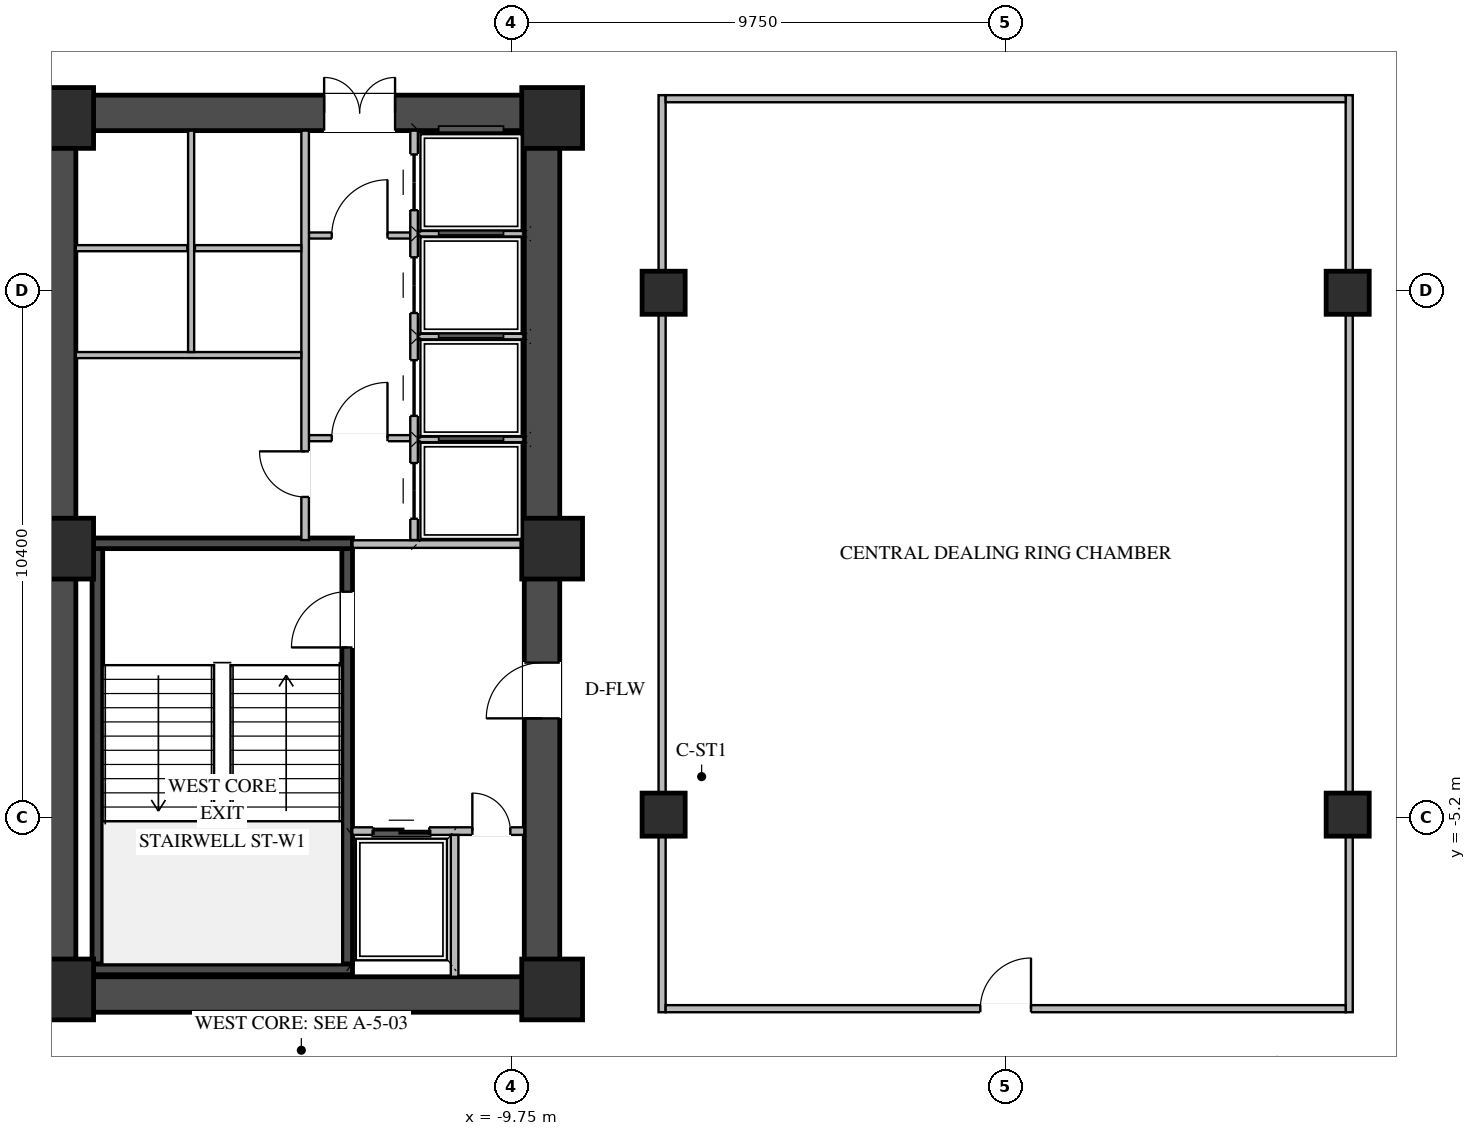
"""IFC4 building model, lengths in metres.
Left out: names, types, materials, properties, quantities, classifications, styles, units other than length and angle.
Written with IfcOpenShell. Run it as: python <this file> out.ifc"""

import sys

from ifc_helpers import new_model, si_unit, direction, frame, frame_2d, origin, origin_2d, place, context, subcontext, project, spatial, rectangle, i_section, extrude, element, fill, save


model = new_model("IFC4")
c1 = context("Model", 3, precision=1e-05, world=origin(), true_north=direction((0.0, 1.0)))
c2 = subcontext(c1, "Body", "Model", "MODEL_VIEW")
j1 = project(units=[si_unit("LENGTHUNIT", "METRE"), si_unit("PLANEANGLEUNIT", "RADIAN")], contexts=[c1])
p1 = place(None, origin())
s1 = spatial("IfcSite", under=j1, at=p1, CompositionType="ELEMENT")
p2 = place(p1, origin())
s2 = spatial("IfcBuilding", under=s1, at=p2, CompositionType="ELEMENT")
p3 = place(p2, frame((0.0, 0.0, 27.0)))
s3 = spatial("IfcBuildingStorey", under=s2, at=p3, CompositionType="ELEMENT", Elevation=27.0)
p4 = place(p3, frame((-19.05, -8.7, 0.0), z_axis=(0.0, 0.0, 1.0), x_axis=(1.0, 0.0, 0.0)))
e1 = element("IfcWall", 1, at=p4, inside=s3, PredefinedType="SHEAR", context=c2, shape_type="SweptSolid", body=[
    extrude(rectangle(XDim=10.25, YDim=0.7, at=frame_2d((5.125, 0.0))), origin(), (0.0, 0.0, 1.0), 4.02),
])
p5 = place(p3, frame((-19.05, 8.7, 0.0), z_axis=(0.0, 0.0, 1.0), x_axis=(1.0, 0.0, 0.0)))
e2 = element("IfcWall", 2, at=p5, inside=s3, PredefinedType="SHEAR", context=c2, shape_type="SweptSolid", body=[
    extrude(rectangle(XDim=10.25, YDim=0.7, at=frame_2d((5.125, 0.0))), origin(), (0.0, 0.0, 1.0), 4.02),
])
p6 = place(p5, frame((5.6, 0.0, 0.0)))
e3 = element("IfcOpeningElement", 3, at=p6, cuts=e2, PredefinedType="OPENING", context=c2, shape_type="SweptSolid", body=[
    extrude(rectangle(XDim=1.4, YDim=2.05, at=frame_2d((0.7, 1.025))), frame((0.0, 0.36, 0.0), z_axis=(0.0, -1.0, 0.0), x_axis=(1.0, 0.0, 0.0)), (0.0, 0.0, 1.0), 0.72),
])
p7 = place(p3, frame((-18.7, -8.35, 0.0), z_axis=(0.0, 0.0, 1.0), x_axis=(0.0, 1.0, 0.0)))
e4 = element("IfcWall", 4, at=p7, inside=s3, PredefinedType="SHEAR", context=c2, shape_type="SweptSolid", body=[
    extrude(rectangle(XDim=16.7, YDim=0.7, at=frame_2d((8.35, 0.0))), origin(), (0.0, 0.0, 1.0), 4.02),
])
p8 = place(p3, frame((-9.15, -8.35, 0.0), z_axis=(0.0, 0.0, 1.0), x_axis=(0.0, 1.0, 0.0)))
e5 = element("IfcWall", 5, at=p8, inside=s3, PredefinedType="SHEAR", context=c2, shape_type="SweptSolid", body=[
    extrude(rectangle(XDim=16.7, YDim=0.7, at=frame_2d((8.35, 0.0))), origin(), (0.0, 0.0, 1.0), 4.02),
])
p9 = place(p8, frame((5.1, 0.0, 0.0)))
e6 = element("IfcOpeningElement", 6, at=p9, cuts=e5, PredefinedType="OPENING", context=c2, shape_type="SweptSolid", body=[
    extrude(rectangle(XDim=1.1, YDim=2.08, at=frame_2d((0.55, 1.04))), frame((0.0, 0.36, 0.0), z_axis=(0.0, -1.0, 0.0), x_axis=(1.0, 0.0, 0.0)), (0.0, 0.0, 1.0), 0.72),
])
p10 = place(p3, frame((-12.995, -8.1, 0.0), z_axis=(0.0, 0.0, 1.0), x_axis=(0.0, 1.0, 0.0)))
e7 = element("IfcWall", 7, at=p10, inside=s3, PredefinedType="SHEAR", context=c2, shape_type="SweptSolid", body=[
    extrude(rectangle(XDim=8.2, YDim=0.21, at=frame_2d((4.1, 0.0))), origin(), (0.0, 0.0, 1.0), 4.02),
])
p11 = place(p10, frame((6.25, 0.0, 0.0)))
e8 = element("IfcOpeningElement", 8, at=p11, cuts=e7, PredefinedType="OPENING", context=c2, shape_type="SweptSolid", body=[
    extrude(rectangle(XDim=1.1, YDim=2.15, at=frame_2d((0.55, 1.075))), frame((0.0, 0.115, 0.0), z_axis=(0.0, -1.0, 0.0), x_axis=(1.0, 0.0, 0.0)), (0.0, 0.0, 1.0), 0.23),
])
p12 = place(p3, frame((-17.925, -8.1, 0.0), z_axis=(0.0, 0.0, 1.0), x_axis=(0.0, 1.0, 0.0)))
e9 = element("IfcWall", 9, at=p12, inside=s3, PredefinedType="SHEAR", context=c2, shape_type="SweptSolid", body=[
    extrude(rectangle(XDim=8.2, YDim=0.21, at=frame_2d((4.1, 0.0))), origin(), (0.0, 0.0, 1.0), 4.02),
])
for number, where, z_axis, x_axis in (
    (10, (-18.03, -8.205, 0.0), (0.0, 0.0, 1.0), (1.0, 0.0, 0.0)),
    (11, (-12.89, 0.205, 0.0), (0.0, 0.0, 1.0), (-1.0, 0.0, 0.0)),
):
    element("IfcWall", number, at=place(p3, frame(where, z_axis=z_axis, x_axis=x_axis)), inside=s3, PredefinedType="SHEAR", context=c2, shape_type="SweptSolid", body=[
        extrude(rectangle(XDim=5.14, YDim=0.21, at=frame_2d((2.57, 0.0))), origin(), (0.0, 0.0, 1.0), 4.02),
    ])
for number, where, z_axis, x_axis in (
    (12, (-8.95, -8.6, 0.0), (0.0, 0.0, 1.0), (1.0, 0.0, 0.0)),
    (13, (-8.95, 0.1, 0.0), (0.0, 0.0, 1.0), (1.0, 0.0, 0.0)),
    (14, (-8.95, 8.6, 0.0), (0.0, 0.0, 1.0), (1.0, 0.0, 0.0)),
    (15, (-18.6, -8.6, 0.0), (0.0, 0.0, 1.0), (1.0, 0.0, 0.0)),
    (16, (-18.6, 0.1, 0.0), (0.0, 0.0, 1.0), (1.0, 0.0, 0.0)),
    (17, (-18.6, 8.6, 0.0), (0.0, 0.0, 1.0), (1.0, 0.0, 0.0)),
):
    element("IfcColumn", number, at=place(p3, frame(where, z_axis=z_axis, x_axis=x_axis)), inside=s3, PredefinedType="COLUMN", context=c2, shape_type="SweptSolid", body=[
        extrude(rectangle(XDim=1.2, YDim=1.2, at=origin_2d()), origin(), (0.0, 0.0, 1.0), 4.2),
    ])
for number, where, z_axis, x_axis in (
    (18, (-6.75, -5.15, 0.0), (0.0, 0.0, 1.0), (1.0, 0.0, 0.0)),
    (19, (-6.75, 5.15, 0.0), (0.0, 0.0, 1.0), (1.0, 0.0, 0.0)),
    (20, (6.75, -5.15, 0.0), (0.0, 0.0, 1.0), (1.0, 0.0, 0.0)),
    (21, (6.75, 5.15, 0.0), (0.0, 0.0, 1.0), (1.0, 0.0, 0.0)),
):
    element("IfcColumn", number, at=place(p3, frame(where, z_axis=z_axis, x_axis=x_axis)), inside=s3, PredefinedType="COLUMN", context=c2, shape_type="SweptSolid", body=[
        extrude(i_section(OverallWidth=0.85, OverallDepth=0.85, WebThickness=0.032, FlangeThickness=0.048, at=origin_2d()), origin(), (0.0, 0.0, 1.0), 4.2),
    ])
p13 = place(p3, frame((-12.895, -5.475, 0.0), z_axis=(0.0, 0.0, 1.0), x_axis=(1.0, 0.0, 0.0)))
e22 = element("IfcWall", 22, at=p13, inside=s3, PredefinedType="STANDARD", context=c2, shape_type="SweptSolid", body=[
    extrude(rectangle(XDim=3.395, YDim=0.15, at=frame_2d((1.698, 0.0))), origin(), (0.0, 0.0, 1.0), 4.0),
])
p14 = place(p13, frame((0.42, 0.0, 0.0)))
e23 = element("IfcOpeningElement", 23, at=p14, cuts=e22, PredefinedType="OPENING", context=c2, shape_type="SweptSolid", body=[
    extrude(rectangle(XDim=1.1, YDim=2.15, at=frame_2d((0.55, 1.075))), frame((0.0, 0.085, 0.0), z_axis=(0.0, -1.0, 0.0), x_axis=(1.0, 0.0, 0.0)), (0.0, 0.0, 1.0), 0.17),
])
p15 = place(p13, frame((2.37, 0.0, 0.0)))
e24 = element("IfcOpeningElement", 24, at=p15, cuts=e22, PredefinedType="OPENING", context=c2, shape_type="SweptSolid", body=[
    extrude(rectangle(XDim=0.75, YDim=2.05, at=frame_2d((0.375, 1.025))), frame((0.0, 0.085, 0.0), z_axis=(0.0, -1.0, 0.0), x_axis=(1.0, 0.0, 0.0)), (0.0, 0.0, 1.0), 0.17),
])
p16 = place(p3, frame((-10.875, -8.35, 0.0), z_axis=(0.0, 0.0, 1.0), x_axis=(0.0, 1.0, 0.0)))
e25 = element("IfcWall", 25, at=p16, inside=s3, PredefinedType="STANDARD", context=c2, shape_type="SweptSolid", body=[
    extrude(rectangle(XDim=2.8, YDim=0.15, at=frame_2d((1.4, 0.0))), origin(), (0.0, 0.0, 1.0), 4.0),
])
p17 = place(p3, frame((-12.89, 0.19, 0.0), z_axis=(0.0, 0.0, 1.0), x_axis=(1.0, 0.0, 0.0)))
e26 = element("IfcWall", 26, at=p17, inside=s3, PredefinedType="STANDARD", context=c2, shape_type="SweptSolid", body=[
    extrude(rectangle(XDim=3.39, YDim=0.15, at=frame_2d((1.695, 0.0))), origin(), (0.0, 0.0, 1.0), 3.395),
])
p18 = place(p3, frame((-13.75, 2.28, 0.0), z_axis=(0.0, 0.0, 1.0), x_axis=(1.0, 0.0, 0.0)))
e27 = element("IfcWall", 27, at=p18, inside=s3, PredefinedType="STANDARD", context=c2, shape_type="SweptSolid", body=[
    extrude(rectangle(XDim=2.0, YDim=0.12, at=frame_2d((1.0, 0.0))), origin(), (0.0, 0.0, 1.0), 4.0),
])
p19 = place(p18, frame((0.45, 0.0, 0.0)))
e28 = element("IfcOpeningElement", 28, at=p19, cuts=e27, PredefinedType="OPENING", context=c2, shape_type="SweptSolid", body=[
    extrude(rectangle(XDim=1.1, YDim=2.1, at=frame_2d((0.55, 1.05))), frame((0.0, 0.07, 0.0), z_axis=(0.0, -1.0, 0.0), x_axis=(1.0, 0.0, 0.0)), (0.0, 0.0, 1.0), 0.14),
])
p20 = place(p3, frame((-13.75, 6.28, 0.0), z_axis=(0.0, 0.0, 1.0), x_axis=(1.0, 0.0, 0.0)))
e29 = element("IfcWall", 29, at=p20, inside=s3, PredefinedType="STANDARD", context=c2, shape_type="SweptSolid", body=[
    extrude(rectangle(XDim=2.0, YDim=0.12, at=frame_2d((1.0, 0.0))), origin(), (0.0, 0.0, 1.0), 4.0),
])
p21 = place(p20, frame((0.45, 0.0, 0.0)))
e30 = element("IfcOpeningElement", 30, at=p21, cuts=e29, PredefinedType="OPENING", context=c2, shape_type="SweptSolid", body=[
    extrude(rectangle(XDim=1.1, YDim=2.1, at=frame_2d((0.55, 1.05))), frame((0.0, 0.07, 0.0), z_axis=(0.0, -1.0, 0.0), x_axis=(1.0, 0.0, 0.0)), (0.0, 0.0, 1.0), 0.14),
])
p22 = place(p3, frame((-11.675, 0.27, 0.0), z_axis=(0.0, 0.0, 1.0), x_axis=(0.0, 1.0, 0.0)))
e31 = element("IfcWall", 31, at=p22, inside=s3, PredefinedType="STANDARD", context=c2, shape_type="SweptSolid", body=[
    extrude(rectangle(XDim=8.08, YDim=0.15, at=frame_2d((4.04, 0.0))), origin(), (0.0, 0.0, 1.0), 4.0),
])
p23 = place(p22, frame((0.42, 0.0, 0.0)))
e32 = element("IfcOpeningElement", 32, at=p23, cuts=e31, PredefinedType="OPENING", context=c2, shape_type="SweptSolid", body=[
    extrude(rectangle(XDim=1.1, YDim=2.1, at=frame_2d((0.55, 1.05))), frame((0.0, 0.085, 0.0), z_axis=(0.0, -1.0, 0.0), x_axis=(1.0, 0.0, 0.0)), (0.0, 0.0, 1.0), 0.17),
])
p24 = place(p22, frame((2.45, 0.0, 0.0)))
e33 = element("IfcOpeningElement", 33, at=p24, cuts=e31, PredefinedType="OPENING", context=c2, shape_type="SweptSolid", body=[
    extrude(rectangle(XDim=1.1, YDim=2.1, at=frame_2d((0.55, 1.05))), frame((0.0, 0.085, 0.0), z_axis=(0.0, -1.0, 0.0), x_axis=(1.0, 0.0, 0.0)), (0.0, 0.0, 1.0), 0.17),
])
p25 = place(p22, frame((4.48, 0.0, 0.0)))
e34 = element("IfcOpeningElement", 34, at=p25, cuts=e31, PredefinedType="OPENING", context=c2, shape_type="SweptSolid", body=[
    extrude(rectangle(XDim=1.1, YDim=2.1, at=frame_2d((0.55, 1.05))), frame((0.0, 0.085, 0.0), z_axis=(0.0, -1.0, 0.0), x_axis=(1.0, 0.0, 0.0)), (0.0, 0.0, 1.0), 0.17),
])
p26 = place(p22, frame((6.51, 0.0, 0.0)))
e35 = element("IfcOpeningElement", 35, at=p26, cuts=e31, PredefinedType="OPENING", context=c2, shape_type="SweptSolid", body=[
    extrude(rectangle(XDim=1.1, YDim=2.1, at=frame_2d((0.55, 1.05))), frame((0.0, 0.085, 0.0), z_axis=(0.0, -1.0, 0.0), x_axis=(1.0, 0.0, 0.0)), (0.0, 0.0, 1.0), 0.17),
])
for number, where, z_axis, x_axis in (
    (36, (-11.6, 2.255, 0.0), (0.0, 0.0, 1.0), (1.0, 0.0, 0.0)),
    (37, (-11.6, 4.285, 0.0), (0.0, 0.0, 1.0), (1.0, 0.0, 0.0)),
    (38, (-11.6, 6.315, 0.0), (0.0, 0.0, 1.0), (1.0, 0.0, 0.0)),
):
    element("IfcWall", number, at=place(p3, frame(where, z_axis=z_axis, x_axis=x_axis)), inside=s3, PredefinedType="STANDARD", context=c2, shape_type="SweptSolid", body=[
        extrude(rectangle(XDim=2.1, YDim=0.11, at=frame_2d((1.05, 0.0))), origin(), (0.0, 0.0, 1.0), 4.0),
    ])
p27 = place(p3, frame((-13.825, 0.27, 0.0), z_axis=(0.0, 0.0, 1.0), x_axis=(0.0, 1.0, 0.0)))
e39 = element("IfcWall", 39, at=p27, inside=s3, PredefinedType="STANDARD", context=c2, shape_type="SweptSolid", body=[
    extrude(rectangle(XDim=8.08, YDim=0.15, at=frame_2d((4.04, 0.0))), origin(), (0.0, 0.0, 1.0), 4.0),
])
p28 = place(p27, frame((0.85, 0.0, 0.0)))
e40 = element("IfcOpeningElement", 40, at=p28, cuts=e39, PredefinedType="OPENING", context=c2, shape_type="SweptSolid", body=[
    extrude(rectangle(XDim=0.9, YDim=2.05, at=frame_2d((0.45, 1.025))), frame((0.0, 0.085, 0.0), z_axis=(0.0, -1.0, 0.0), x_axis=(1.0, 0.0, 0.0)), (0.0, 0.0, 1.0), 0.17),
])
p29 = place(p3, frame((-18.35, 3.92, 0.0), z_axis=(0.0, 0.0, 1.0), x_axis=(1.0, 0.0, 0.0)))
e41 = element("IfcWall", 41, at=p29, inside=s3, PredefinedType="STANDARD", context=c2, shape_type="SweptSolid", body=[
    extrude(rectangle(XDim=4.45, YDim=0.12, at=frame_2d((2.225, 0.0))), origin(), (0.0, 0.0, 1.0), 4.0),
])
p30 = place(p3, frame((-18.35, 6.03, 0.0), z_axis=(0.0, 0.0, 1.0), x_axis=(1.0, 0.0, 0.0)))
e42 = element("IfcWall", 42, at=p30, inside=s3, PredefinedType="STANDARD", context=c2, shape_type="SweptSolid", body=[
    extrude(rectangle(XDim=2.2, YDim=0.12, at=frame_2d((1.1, 0.0))), origin(), (0.0, 0.0, 1.0), 4.0),
])
p31 = place(p3, frame((-16.075, 3.98, 0.0), z_axis=(0.0, 0.0, 1.0), x_axis=(0.0, 1.0, 0.0)))
e43 = element("IfcWall", 43, at=p31, inside=s3, PredefinedType="STANDARD", context=c2, shape_type="SweptSolid", body=[
    extrude(rectangle(XDim=4.37, YDim=0.12, at=frame_2d((2.185, 0.0))), origin(), (0.0, 0.0, 1.0), 4.0),
])
p32 = place(p3, frame((-16.0, 6.03, 0.0), z_axis=(0.0, 0.0, 1.0), x_axis=(1.0, 0.0, 0.0)))
e44 = element("IfcWall", 44, at=p32, inside=s3, PredefinedType="STANDARD", context=c2, shape_type="SweptSolid", body=[
    extrude(rectangle(XDim=2.1, YDim=0.12, at=frame_2d((1.05, 0.0))), origin(), (0.0, 0.0, 1.0), 4.0),
])
for number, where, z_axis, x_axis in (
    (45, (-6.78, -9.05, 0.0), (0.0, 0.0, 1.0), (0.0, 1.0, 0.0)),
    (46, (6.78, -9.05, 0.0), (0.0, 0.0, 1.0), (0.0, 1.0, 0.0)),
):
    element("IfcWall", number, at=place(p3, frame(where, z_axis=z_axis, x_axis=x_axis)), inside=s3, PredefinedType="STANDARD", context=c2, shape_type="SweptSolid", body=[
        extrude(rectangle(XDim=18.1, YDim=0.14, at=frame_2d((9.05, 0.0))), origin(), (0.0, 0.0, 1.0), 3.395),
    ])
p33 = place(p3, frame((-6.71, -8.98, 0.0), z_axis=(0.0, 0.0, 1.0), x_axis=(1.0, 0.0, 0.0)))
e47 = element("IfcWall", 47, at=p33, inside=s3, PredefinedType="STANDARD", context=c2, shape_type="SweptSolid", body=[
    extrude(rectangle(XDim=13.42, YDim=0.14, at=frame_2d((6.71, 0.0))), origin(), (0.0, 0.0, 1.0), 4.0),
])
p34 = place(p33, frame((6.21, 0.0, 0.0)))
e48 = element("IfcOpeningElement", 48, at=p34, cuts=e47, PredefinedType="OPENING", context=c2, shape_type="SweptSolid", body=[
    extrude(rectangle(XDim=1.0, YDim=2.08, at=frame_2d((0.5, 1.04))), frame((0.0, 0.08, 0.0), z_axis=(0.0, -1.0, 0.0), x_axis=(1.0, 0.0, 0.0)), (0.0, 0.0, 1.0), 0.16),
])
p35 = place(p3, frame((-6.71, 8.98, 0.0), z_axis=(0.0, 0.0, 1.0), x_axis=(1.0, 0.0, 0.0)))
e49 = element("IfcWall", 49, at=p35, inside=s3, PredefinedType="STANDARD", context=c2, shape_type="SweptSolid", body=[
    extrude(rectangle(XDim=13.42, YDim=0.14, at=frame_2d((6.71, 0.0))), origin(), (0.0, 0.0, 1.0), 4.0),
])
p36 = place(p11, origin())
e50 = element("IfcDoor", 50, at=p36, inside=s3, OperationType="SINGLE_SWING_LEFT", PredefinedType="DOOR", context=c2, shape_type="SweptSolid", body=[
    extrude(rectangle(XDim=1.1, YDim=2.15, at=frame_2d((0.55, 1.075))), frame((0.0, 0.025, 0.0), z_axis=(0.0, -1.0, 0.0), x_axis=(1.0, 0.0, 0.0)), (0.0, 0.0, 1.0), 0.05),
])
fill(e8, e50)
p37 = place(p14, origin())
e51 = element("IfcDoor", 51, at=p37, inside=s3, OperationType="DOUBLE_DOOR_SLIDING", PredefinedType="DOOR", context=c2, shape_type="SweptSolid", body=[
    extrude(rectangle(XDim=1.1, YDim=2.15, at=frame_2d((0.55, 1.075))), frame((0.0, 0.025, 0.0), z_axis=(0.0, -1.0, 0.0), x_axis=(1.0, 0.0, 0.0)), (0.0, 0.0, 1.0), 0.05),
])
fill(e23, e51)
p38 = place(p15, origin())
e52 = element("IfcDoor", 52, at=p38, inside=s3, OperationType="SINGLE_SWING_LEFT", PredefinedType="DOOR", context=c2, shape_type="SweptSolid", body=[
    extrude(rectangle(XDim=0.75, YDim=2.05, at=frame_2d((0.375, 1.025))), frame((0.0, 0.025, 0.0), z_axis=(0.0, -1.0, 0.0), x_axis=(1.0, 0.0, 0.0)), (0.0, 0.0, 1.0), 0.05),
])
fill(e24, e52)
p39 = place(p9, origin())
e53 = element("IfcDoor", 53, at=p39, inside=s3, OperationType="SINGLE_SWING_LEFT", PredefinedType="DOOR", context=c2, shape_type="SweptSolid", body=[
    extrude(rectangle(XDim=1.1, YDim=2.08, at=frame_2d((0.55, 1.04))), frame((0.0, 0.305, 0.0), z_axis=(0.0, -1.0, 0.0), x_axis=(1.0, 0.0, 0.0)), (0.0, 0.0, 1.0), 0.05),
])
fill(e6, e53)
p40 = place(p19, origin())
e54 = element("IfcDoor", 54, at=p40, inside=s3, OperationType="SINGLE_SWING_RIGHT", PredefinedType="DOOR", context=c2, shape_type="SweptSolid", body=[
    extrude(rectangle(XDim=1.1, YDim=2.1, at=frame_2d((0.55, 1.05))), frame((0.0, 0.025, 0.0), z_axis=(0.0, -1.0, 0.0), x_axis=(1.0, 0.0, 0.0)), (0.0, 0.0, 1.0), 0.05),
])
fill(e28, e54)
p41 = place(p21, origin())
e55 = element("IfcDoor", 55, at=p41, inside=s3, OperationType="SINGLE_SWING_RIGHT", PredefinedType="DOOR", context=c2, shape_type="SweptSolid", body=[
    extrude(rectangle(XDim=1.1, YDim=2.1, at=frame_2d((0.55, 1.05))), frame((0.0, 0.025, 0.0), z_axis=(0.0, -1.0, 0.0), x_axis=(1.0, 0.0, 0.0)), (0.0, 0.0, 1.0), 0.05),
])
fill(e30, e55)
p42 = place(p6, origin())
e56 = element("IfcDoor", 56, at=p42, inside=s3, OperationType="DOUBLE_DOOR_SINGLE_SWING", PredefinedType="DOOR", context=c2, shape_type="SweptSolid", body=[
    extrude(rectangle(XDim=1.4, YDim=2.05, at=frame_2d((0.7, 1.025))), frame((0.0, 0.295, 0.0), z_axis=(0.0, -1.0, 0.0), x_axis=(1.0, 0.0, 0.0)), (0.0, 0.0, 1.0), 0.05),
])
fill(e3, e56)
p43 = place(p23, origin())
e57 = element("IfcDoor", 57, at=p43, inside=s3, OperationType="DOUBLE_DOOR_SLIDING", PredefinedType="DOOR", context=c2, shape_type="SweptSolid", body=[
    extrude(rectangle(XDim=1.1, YDim=2.1, at=frame_2d((0.55, 1.05))), frame((0.0, 0.025, 0.0), z_axis=(0.0, -1.0, 0.0), x_axis=(1.0, 0.0, 0.0)), (0.0, 0.0, 1.0), 0.05),
])
fill(e32, e57)
p44 = place(p24, origin())
e58 = element("IfcDoor", 58, at=p44, inside=s3, OperationType="DOUBLE_DOOR_SLIDING", PredefinedType="DOOR", context=c2, shape_type="SweptSolid", body=[
    extrude(rectangle(XDim=1.1, YDim=2.1, at=frame_2d((0.55, 1.05))), frame((0.0, 0.025, 0.0), z_axis=(0.0, -1.0, 0.0), x_axis=(1.0, 0.0, 0.0)), (0.0, 0.0, 1.0), 0.05),
])
fill(e33, e58)
p45 = place(p25, origin())
e59 = element("IfcDoor", 59, at=p45, inside=s3, OperationType="DOUBLE_DOOR_SLIDING", PredefinedType="DOOR", context=c2, shape_type="SweptSolid", body=[
    extrude(rectangle(XDim=1.1, YDim=2.1, at=frame_2d((0.55, 1.05))), frame((0.0, 0.025, 0.0), z_axis=(0.0, -1.0, 0.0), x_axis=(1.0, 0.0, 0.0)), (0.0, 0.0, 1.0), 0.05),
])
fill(e34, e59)
p46 = place(p26, origin())
e60 = element("IfcDoor", 60, at=p46, inside=s3, OperationType="DOUBLE_DOOR_SLIDING", PredefinedType="DOOR", context=c2, shape_type="SweptSolid", body=[
    extrude(rectangle(XDim=1.1, YDim=2.1, at=frame_2d((0.55, 1.05))), frame((0.0, 0.025, 0.0), z_axis=(0.0, -1.0, 0.0), x_axis=(1.0, 0.0, 0.0)), (0.0, 0.0, 1.0), 0.05),
])
fill(e35, e60)
p47 = place(p28, origin())
e61 = element("IfcDoor", 61, at=p47, inside=s3, OperationType="SINGLE_SWING_RIGHT", PredefinedType="DOOR", context=c2, shape_type="SweptSolid", body=[
    extrude(rectangle(XDim=0.9, YDim=2.05, at=frame_2d((0.45, 1.025))), frame((0.0, 0.025, 0.0), z_axis=(0.0, -1.0, 0.0), x_axis=(1.0, 0.0, 0.0)), (0.0, 0.0, 1.0), 0.05),
])
fill(e40, e61)
p48 = place(p34, origin())
e62 = element("IfcDoor", 62, at=p48, inside=s3, OperationType="SINGLE_SWING_RIGHT", PredefinedType="DOOR", context=c2, shape_type="SweptSolid", body=[
    extrude(rectangle(XDim=1.0, YDim=2.08, at=frame_2d((0.5, 1.04))), frame((0.0, 0.025, 0.0), z_axis=(0.0, -1.0, 0.0), x_axis=(1.0, 0.0, 0.0)), (0.0, 0.0, 1.0), 0.05),
])
fill(e48, e62)
save(model, sys.argv[1])
